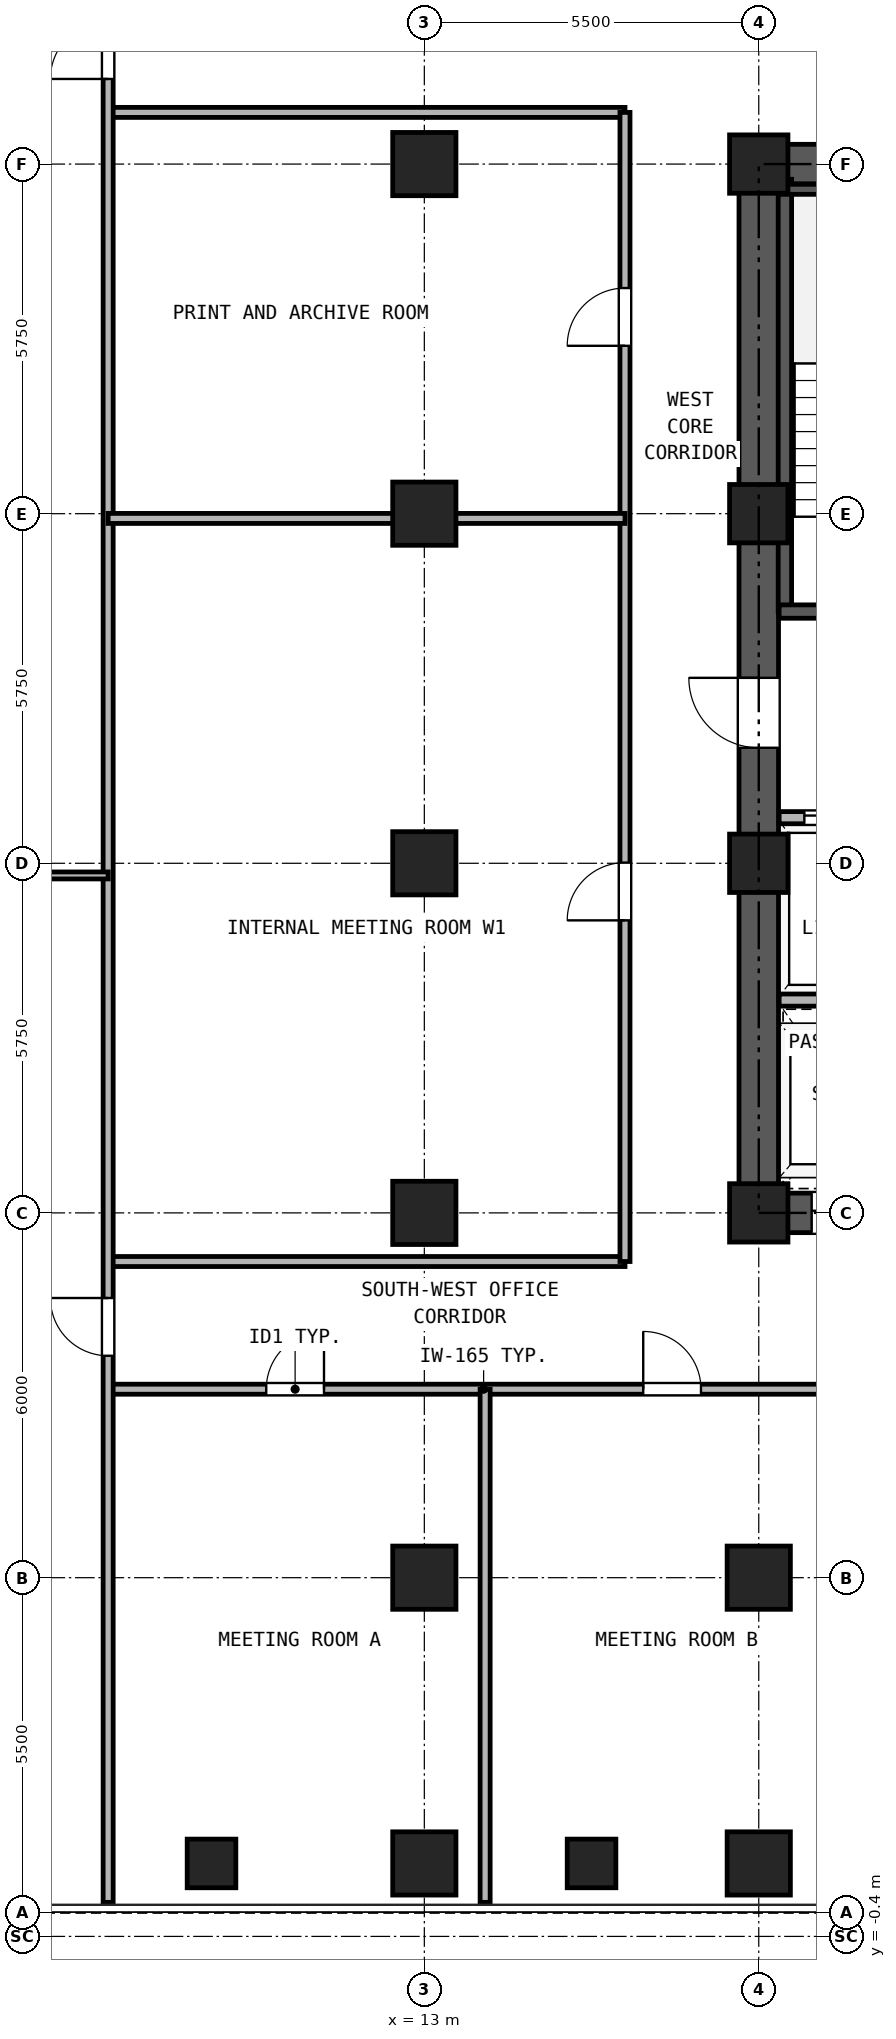
"""IFC4 building model, lengths in metres.
Left out: names, types, materials, properties, quantities, classifications, styles, units other than length and angle.
Written with IfcOpenShell. Run it as: python <this file> out.ifc"""

import sys

from ifc_helpers import new_model, si_unit, direction, frame, frame_2d, origin, origin_2d, place, context, subcontext, project, spatial, rectangle, hollow_rectangle, extrude, source, transform, mapped, element, fill, save


model = new_model("IFC4")
c1 = context("Model", 3, precision=1e-05, world=origin(), true_north=direction((0.0, 1.0)))
c2 = subcontext(c1, "Body", "Model", "MODEL_VIEW")
j1 = project(units=[si_unit("LENGTHUNIT", "METRE"), si_unit("PLANEANGLEUNIT", "RADIAN")], contexts=[c1])
p1 = place(None, origin())
s1 = spatial("IfcSite", under=j1, at=p1, CompositionType="ELEMENT")
p2 = place(p1, origin())
s2 = spatial("IfcBuilding", under=s1, at=p2, CompositionType="ELEMENT")
p3 = place(p2, frame((0.0, 0.0, 69.3)))
s3 = spatial("IfcBuildingStorey", under=s2, at=p3, CompositionType="ELEMENT", Elevation=69.3)
m1 = source(origin(), c2, "Body", "SweptSolid", [
    extrude(hollow_rectangle(XDim=1.04, YDim=1.04, WallThickness=0.065, at=origin_2d()), origin(), (0.0, 0.0, 1.0), 3.32),
])
for number, where, z_axis, x_axis in (
    (1, (13.0, 0.8, 0.0), (0.0, 0.0, 1.0), (1.0, 0.0, 0.0)),
    (2, (18.5, 0.8, 0.0), (0.0, 0.0, 1.0), (1.0, 0.0, 0.0)),
    (3, (13.0, 5.5, 0.0), (0.0, 0.0, 1.0), (1.0, 0.0, 0.0)),
    (4, (13.0, 11.5, 0.0), (0.0, 0.0, 1.0), (1.0, 0.0, 0.0)),
    (5, (13.0, 17.25, 0.0), (0.0, 0.0, 1.0), (1.0, 0.0, 0.0)),
    (6, (13.0, 23.0, 0.0), (0.0, 0.0, 1.0), (1.0, 0.0, 0.0)),
    (7, (13.0, 28.75, 0.0), (0.0, 0.0, 1.0), (1.0, 0.0, 0.0)),
    (8, (18.5, 5.5, 0.0), (0.0, 0.0, 1.0), (1.0, 0.0, 0.0)),
):
    element("IfcColumn", number, at=place(p3, frame(where, z_axis=z_axis, x_axis=x_axis)), inside=s3, PredefinedType="COLUMN", context=c2, shape_type="MappedRepresentation", body=[
        mapped(m1, transform((0.0, 0.0, 0.0), x_axis=(1.0, 0.0, 0.0), y_axis=(0.0, 1.0, 0.0), z_axis=(0.0, 0.0, 1.0), scale=1.0)),
    ])
m2 = source(origin(), c2, "Body", "SweptSolid", [
    extrude(hollow_rectangle(XDim=0.96, YDim=0.96, WallThickness=0.06, at=origin_2d()), origin(), (0.0, 0.0, 1.0), 3.32),
])
for number, where, z_axis, x_axis in (
    (9, (18.5, 11.5, 0.0), (0.0, 0.0, 1.0), (1.0, 0.0, 0.0)),
    (10, (18.5, 17.25, 0.0), (0.0, 0.0, 1.0), (1.0, 0.0, 0.0)),
    (11, (18.5, 23.0, 0.0), (0.0, 0.0, 1.0), (1.0, 0.0, 0.0)),
    (12, (18.5, 28.75, 0.0), (0.0, 0.0, 1.0), (1.0, 0.0, 0.0)),
):
    element("IfcColumn", number, at=place(p3, frame(where, z_axis=z_axis, x_axis=x_axis)), inside=s3, PredefinedType="COLUMN", context=c2, shape_type="MappedRepresentation", body=[
        mapped(m2, transform((0.0, 0.0, 0.0), x_axis=(1.0, 0.0, 0.0), y_axis=(0.0, 1.0, 0.0), z_axis=(0.0, 0.0, 1.0), scale=1.0)),
    ])
m3 = source(origin(), c2, "Body", "SweptSolid", [
    extrude(hollow_rectangle(XDim=0.8, YDim=0.8, WallThickness=0.045, at=origin_2d()), origin(), (0.0, 0.0, 1.0), 3.32),
])
for number, where, z_axis, x_axis in (
    (13, (9.5, 0.8, 0.0), (0.0, 0.0, 1.0), (1.0, 0.0, 0.0)),
    (14, (15.75, 0.8, 0.0), (0.0, 0.0, 1.0), (1.0, 0.0, 0.0)),
):
    element("IfcColumn", number, at=place(p3, frame(where, z_axis=z_axis, x_axis=x_axis)), inside=s3, PredefinedType="COLUMN", context=c2, shape_type="MappedRepresentation", body=[
        mapped(m3, transform((0.0, 0.0, 0.0), x_axis=(1.0, 0.0, 0.0), y_axis=(0.0, 1.0, 0.0), z_axis=(0.0, 0.0, 1.0), scale=1.0)),
    ])
p4 = place(p3, frame((18.175, 11.5, 0.0), z_axis=(0.0, 0.0, 1.0), x_axis=(1.0, 0.0, 0.0)))
e15 = element("IfcWall", 15, at=p4, inside=s3, PredefinedType="SHEAR", context=c2, shape_type="SweptSolid", body=[
    extrude(rectangle(XDim=10.65, YDim=0.65, at=frame_2d((5.325, 0.0))), origin(), (0.0, 0.0, 1.0), 3.32),
])
p5 = place(p4, frame((1.195, 0.0, 0.0)))
e16 = element("IfcOpeningElement", 16, at=p5, cuts=e15, PredefinedType="OPENING", context=c2, shape_type="SweptSolid", body=[
    extrude(rectangle(XDim=1.1, YDim=2.25, at=frame_2d((0.55, 1.125))), frame((0.0, 0.335, 0.0), z_axis=(0.0, -1.0, 0.0), x_axis=(1.0, 0.0, 0.0)), (0.0, 0.0, 1.0), 0.67),
])
p6 = place(p4, frame((3.495, 0.0, 0.0)))
e17 = element("IfcOpeningElement", 17, at=p6, cuts=e15, PredefinedType="OPENING", context=c2, shape_type="SweptSolid", body=[
    extrude(rectangle(XDim=1.1, YDim=2.25, at=frame_2d((0.55, 1.125))), frame((0.0, 0.335, 0.0), z_axis=(0.0, -1.0, 0.0), x_axis=(1.0, 0.0, 0.0)), (0.0, 0.0, 1.0), 0.67),
])
p7 = place(p4, frame((5.925, 0.0, 0.0)))
e18 = element("IfcOpeningElement", 18, at=p7, cuts=e15, PredefinedType="OPENING", context=c2, shape_type="SweptSolid", body=[
    extrude(rectangle(XDim=1.1, YDim=2.25, at=frame_2d((0.55, 1.125))), frame((0.0, 0.335, 0.0), z_axis=(0.0, -1.0, 0.0), x_axis=(1.0, 0.0, 0.0)), (0.0, 0.0, 1.0), 0.67),
])
p8 = place(p4, frame((8.325, 0.0, 0.0)))
e19 = element("IfcOpeningElement", 19, at=p8, cuts=e15, PredefinedType="OPENING", context=c2, shape_type="SweptSolid", body=[
    extrude(rectangle(XDim=1.1, YDim=2.25, at=frame_2d((0.55, 1.125))), frame((0.0, 0.335, 0.0), z_axis=(0.0, -1.0, 0.0), x_axis=(1.0, 0.0, 0.0)), (0.0, 0.0, 1.0), 0.67),
])
p9 = place(p3, frame((18.175, 28.75, 0.0), z_axis=(0.0, 0.0, 1.0), x_axis=(1.0, 0.0, 0.0)))
e20 = element("IfcWall", 20, at=p9, inside=s3, PredefinedType="SHEAR", context=c2, shape_type="SweptSolid", body=[
    extrude(rectangle(XDim=10.65, YDim=0.65, at=frame_2d((5.325, 0.0))), origin(), (0.0, 0.0, 1.0), 3.32),
])
p10 = place(p9, frame((4.205, 0.0, 0.0)))
e21 = element("IfcOpeningElement", 21, at=p10, cuts=e20, PredefinedType="OPENING", context=c2, shape_type="SweptSolid", body=[
    extrude(rectangle(XDim=0.9, YDim=2.05, at=frame_2d((0.45, 1.025))), frame((0.0, 0.335, 0.0), z_axis=(0.0, -1.0, 0.0), x_axis=(1.0, 0.0, 0.0)), (0.0, 0.0, 1.0), 0.67),
])
p11 = place(p9, frame((5.745, 0.0, 0.0)))
e22 = element("IfcOpeningElement", 22, at=p11, cuts=e20, PredefinedType="OPENING", context=c2, shape_type="SweptSolid", body=[
    extrude(rectangle(XDim=0.9, YDim=2.05, at=frame_2d((0.45, 1.025))), frame((0.0, 0.335, 0.0), z_axis=(0.0, -1.0, 0.0), x_axis=(1.0, 0.0, 0.0)), (0.0, 0.0, 1.0), 0.67),
])
p12 = place(p3, frame((18.5, 11.825, 0.0), z_axis=(0.0, 0.0, 1.0), x_axis=(0.0, 1.0, 0.0)))
e23 = element("IfcWall", 23, at=p12, inside=s3, PredefinedType="SHEAR", context=c2, shape_type="SweptSolid", body=[
    extrude(rectangle(XDim=16.6, YDim=0.65, at=frame_2d((8.3, 0.0))), origin(), (0.0, 0.0, 1.0), 3.32),
])
p13 = place(p12, frame((7.325, 0.0, 0.0)))
e24 = element("IfcOpeningElement", 24, at=p13, cuts=e23, PredefinedType="OPENING", context=c2, shape_type="SweptSolid", body=[
    extrude(rectangle(XDim=1.15, YDim=2.2, at=frame_2d((0.575, 1.1))), frame((0.0, 0.335, 0.0), z_axis=(0.0, -1.0, 0.0), x_axis=(1.0, 0.0, 0.0)), (0.0, 0.0, 1.0), 0.67),
])
p14 = place(p3, frame((18.93, 21.39, 0.0), z_axis=(0.0, 0.0, 1.0), x_axis=(0.0, 1.0, 0.0)))
e25 = element("IfcWall", 25, at=p14, inside=s3, PredefinedType="SOLIDWALL", context=c2, shape_type="SweptSolid", body=[
    extrude(rectangle(XDim=7.11, YDim=0.22, at=frame_2d((3.555, 0.0))), origin(), (0.0, 0.0, 1.0), 3.32),
])
p15 = place(p3, frame((18.835, 28.335, 0.0), z_axis=(0.0, 0.0, 1.0), x_axis=(1.0, 0.0, 0.0)))
e26 = element("IfcWall", 26, at=p15, inside=s3, PredefinedType="PARTITIONING", context=c2, shape_type="SweptSolid", body=[
    extrude(rectangle(XDim=3.275, YDim=0.165, at=frame_2d((1.638, 0.0))), origin(), (0.0, 0.0, 1.0), 3.32),
])
p16 = place(p3, frame((18.835, 21.39, 0.0), z_axis=(0.0, 0.0, 1.0), x_axis=(1.0, 0.0, 0.0)))
e27 = element("IfcWall", 27, at=p16, inside=s3, PredefinedType="SOLIDWALL", context=c2, shape_type="SweptSolid", body=[
    extrude(rectangle(XDim=6.295, YDim=0.22, at=frame_2d((3.147, 0.0))), origin(), (0.0, 0.0, 1.0), 3.32),
])
p17 = place(p16, frame((1.015, 0.0, 0.0)))
e28 = element("IfcOpeningElement", 28, at=p17, cuts=e27, PredefinedType="OPENING", context=c2, shape_type="SweptSolid", body=[
    extrude(rectangle(XDim=1.15, YDim=2.2, at=frame_2d((0.575, 1.1))), frame((0.0, 0.12, 0.0), z_axis=(0.0, -1.0, 0.0), x_axis=(1.0, 0.0, 0.0)), (0.0, 0.0, 1.0), 0.24),
])
p18 = place(p16, frame((4.745, 0.0, 0.0)))
e29 = element("IfcOpeningElement", 29, at=p18, cuts=e27, PredefinedType="OPENING", context=c2, shape_type="SweptSolid", body=[
    extrude(rectangle(XDim=1.1, YDim=2.25, at=frame_2d((0.55, 1.125))), frame((0.0, 0.12, 0.0), z_axis=(0.0, -1.0, 0.0), x_axis=(1.0, 0.0, 0.0)), (0.0, 0.0, 1.0), 0.24),
])
p19 = place(p3, frame((18.835, 18.0, 0.0), z_axis=(0.0, 0.0, 1.0), x_axis=(1.0, 0.0, 0.0)))
e30 = element("IfcWall", 30, at=p19, inside=s3, PredefinedType="PARTITIONING", context=c2, shape_type="SweptSolid", body=[
    extrude(rectangle(XDim=9.33, YDim=0.2, at=frame_2d((4.665, 0.0))), origin(), (0.0, 0.0, 1.0), 3.32),
])
p20 = place(p19, frame((0.415, 0.0, 0.0)))
e31 = element("IfcOpeningElement", 31, at=p20, cuts=e30, PredefinedType="OPENING", context=c2, shape_type="SweptSolid", body=[
    extrude(rectangle(XDim=1.3, YDim=2.3, at=frame_2d((0.65, 1.15))), frame((0.0, 0.11, 0.0), z_axis=(0.0, -1.0, 0.0), x_axis=(1.0, 0.0, 0.0)), (0.0, 0.0, 1.0), 0.22),
])
p21 = place(p19, frame((2.515, 0.0, 0.0)))
e32 = element("IfcOpeningElement", 32, at=p21, cuts=e30, PredefinedType="OPENING", context=c2, shape_type="SweptSolid", body=[
    extrude(rectangle(XDim=1.3, YDim=2.3, at=frame_2d((0.65, 1.15))), frame((0.0, 0.11, 0.0), z_axis=(0.0, -1.0, 0.0), x_axis=(1.0, 0.0, 0.0)), (0.0, 0.0, 1.0), 0.22),
])
p22 = place(p19, frame((7.015, 0.0, 0.0)))
e33 = element("IfcOpeningElement", 33, at=p22, cuts=e30, PredefinedType="OPENING", context=c2, shape_type="SweptSolid", body=[
    extrude(rectangle(XDim=1.0, YDim=2.15, at=frame_2d((0.5, 1.075))), frame((0.0, 0.11, 0.0), z_axis=(0.0, -1.0, 0.0), x_axis=(1.0, 0.0, 0.0)), (0.0, 0.0, 1.0), 0.22),
])
p23 = place(p3, frame((18.835, 15.0, 0.0), z_axis=(0.0, 0.0, 1.0), x_axis=(1.0, 0.0, 0.0)))
e34 = element("IfcWall", 34, at=p23, inside=s3, PredefinedType="PARTITIONING", context=c2, shape_type="SweptSolid", body=[
    extrude(rectangle(XDim=9.33, YDim=0.2, at=frame_2d((4.665, 0.0))), origin(), (0.0, 0.0, 1.0), 3.32),
])
p24 = place(p3, frame((7.8, 8.6, 0.0), z_axis=(0.0, 0.0, 1.0), x_axis=(1.0, 0.0, 0.0)))
e35 = element("IfcWall", 35, at=p24, inside=s3, PredefinedType="PARTITIONING", context=c2, shape_type="SweptSolid", body=[
    extrude(rectangle(XDim=31.4, YDim=0.165, at=frame_2d((15.7, 0.0))), origin(), (0.0, 0.0, 1.0), 2.898),
])
p25 = place(p24, frame((2.6, 0.0, 0.0)))
e36 = element("IfcOpeningElement", 36, at=p25, cuts=e35, PredefinedType="OPENING", context=c2, shape_type="SweptSolid", body=[
    extrude(rectangle(XDim=0.95, YDim=2.15, at=frame_2d((0.475, 1.075))), frame((0.0, 0.093, 0.0), z_axis=(0.0, -1.0, 0.0), x_axis=(1.0, 0.0, 0.0)), (0.0, 0.0, 1.0), 0.185),
])
p26 = place(p24, frame((8.8, 0.0, 0.0)))
e37 = element("IfcOpeningElement", 37, at=p26, cuts=e35, PredefinedType="OPENING", context=c2, shape_type="SweptSolid", body=[
    extrude(rectangle(XDim=0.95, YDim=2.15, at=frame_2d((0.475, 1.075))), frame((0.0, 0.093, 0.0), z_axis=(0.0, -1.0, 0.0), x_axis=(1.0, 0.0, 0.0)), (0.0, 0.0, 1.0), 0.185),
])
p27 = place(p24, frame((15.0, 0.0, 0.0)))
e38 = element("IfcOpeningElement", 38, at=p27, cuts=e35, PredefinedType="OPENING", context=c2, shape_type="SweptSolid", body=[
    extrude(rectangle(XDim=0.95, YDim=2.15, at=frame_2d((0.475, 1.075))), frame((0.0, 0.093, 0.0), z_axis=(0.0, -1.0, 0.0), x_axis=(1.0, 0.0, 0.0)), (0.0, 0.0, 1.0), 0.185),
])
p28 = place(p24, frame((21.2, 0.0, 0.0)))
e39 = element("IfcOpeningElement", 39, at=p28, cuts=e35, PredefinedType="OPENING", context=c2, shape_type="SweptSolid", body=[
    extrude(rectangle(XDim=0.95, YDim=2.15, at=frame_2d((0.475, 1.075))), frame((0.0, 0.093, 0.0), z_axis=(0.0, -1.0, 0.0), x_axis=(1.0, 0.0, 0.0)), (0.0, 0.0, 1.0), 0.185),
])
p29 = place(p24, frame((26.2, 0.0, 0.0)))
e40 = element("IfcOpeningElement", 40, at=p29, cuts=e35, PredefinedType="OPENING", context=c2, shape_type="SweptSolid", body=[
    extrude(rectangle(XDim=0.95, YDim=2.15, at=frame_2d((0.475, 1.075))), frame((0.0, 0.093, 0.0), z_axis=(0.0, -1.0, 0.0), x_axis=(1.0, 0.0, 0.0)), (0.0, 0.0, 1.0), 0.185),
])
p30 = place(p24, frame((29.5, 0.0, 0.0)))
e41 = element("IfcOpeningElement", 41, at=p30, cuts=e35, PredefinedType="OPENING", context=c2, shape_type="SweptSolid", body=[
    extrude(rectangle(XDim=0.92, YDim=2.1, at=frame_2d((0.46, 1.05))), frame((0.0, 0.093, 0.0), z_axis=(0.0, -1.0, 0.0), x_axis=(1.0, 0.0, 0.0)), (0.0, 0.0, 1.0), 0.185),
])
for number, where, z_axis, x_axis in (
    (42, (7.8, 10.7, 0.0), (0.0, 0.0, 1.0), (1.0, 0.0, 0.0)),
    (43, (7.8, 29.6, 0.0), (0.0, 0.0, 1.0), (1.0, 0.0, 0.0)),
):
    element("IfcWall", number, at=place(p3, frame(where, z_axis=z_axis, x_axis=x_axis)), inside=s3, PredefinedType="PARTITIONING", context=c2, shape_type="SweptSolid", body=[
        extrude(rectangle(XDim=8.5, YDim=0.165, at=frame_2d((4.25, 0.0))), origin(), (0.0, 0.0, 1.0), 3.32),
    ])
p31 = place(p3, frame((16.3, 10.7, 0.0), z_axis=(0.0, 0.0, 1.0), x_axis=(0.0, 1.0, 0.0)))
e44 = element("IfcWall", 44, at=p31, inside=s3, PredefinedType="PARTITIONING", context=c2, shape_type="SweptSolid", body=[
    extrude(rectangle(XDim=18.9, YDim=0.165, at=frame_2d((9.45, 0.0))), origin(), (0.0, 0.0, 1.0), 3.32),
])
p32 = place(p31, frame((5.611, 0.0, 0.0)))
e45 = element("IfcOpeningElement", 45, at=p32, cuts=e44, PredefinedType="OPENING", context=c2, shape_type="SweptSolid", body=[
    extrude(rectangle(XDim=0.95, YDim=2.15, at=frame_2d((0.475, 1.075))), frame((0.0, 0.093, 0.0), z_axis=(0.0, -1.0, 0.0), x_axis=(1.0, 0.0, 0.0)), (0.0, 0.0, 1.0), 0.185),
])
p33 = place(p31, frame((15.061, 0.0, 0.0)))
e46 = element("IfcOpeningElement", 46, at=p33, cuts=e44, PredefinedType="OPENING", context=c2, shape_type="SweptSolid", body=[
    extrude(rectangle(XDim=0.95, YDim=2.15, at=frame_2d((0.475, 1.075))), frame((0.0, 0.093, 0.0), z_axis=(0.0, -1.0, 0.0), x_axis=(1.0, 0.0, 0.0)), (0.0, 0.0, 1.0), 0.185),
])
p34 = place(p3, frame((7.8, 0.16, 0.0), z_axis=(0.0, 0.0, 1.0), x_axis=(0.0, 1.0, 0.0)))
e47 = element("IfcWall", 47, at=p34, inside=s3, PredefinedType="PARTITIONING", context=c2, shape_type="SweptSolid", body=[
    extrude(rectangle(XDim=40.18, YDim=0.165, at=frame_2d((20.09, 0.0))), origin(), (0.0, 0.0, 1.0), 3.32),
])
p35 = place(p34, frame((8.99, 0.0, 0.0)))
e48 = element("IfcOpeningElement", 48, at=p35, cuts=e47, PredefinedType="OPENING", context=c2, shape_type="SweptSolid", body=[
    extrude(rectangle(XDim=0.95, YDim=2.15, at=frame_2d((0.475, 1.075))), frame((0.0, 0.093, 0.0), z_axis=(0.0, -1.0, 0.0), x_axis=(1.0, 0.0, 0.0)), (0.0, 0.0, 1.0), 0.185),
])
p36 = place(p34, frame((29.99, 0.0, 0.0)))
e49 = element("IfcOpeningElement", 49, at=p36, cuts=e47, PredefinedType="OPENING", context=c2, shape_type="SweptSolid", body=[
    extrude(rectangle(XDim=0.95, YDim=2.15, at=frame_2d((0.475, 1.075))), frame((0.0, 0.093, 0.0), z_axis=(0.0, -1.0, 0.0), x_axis=(1.0, 0.0, 0.0)), (0.0, 0.0, 1.0), 0.185),
])
p37 = place(p3, frame((14.0, 0.16, 0.0), z_axis=(0.0, 0.0, 1.0), x_axis=(0.0, 1.0, 0.0)))
e50 = element("IfcWall", 50, at=p37, inside=s3, PredefinedType="PARTITIONING", context=c2, shape_type="SweptSolid", body=[
    extrude(rectangle(XDim=8.44, YDim=0.165, at=frame_2d((4.22, 0.0))), origin(), (0.0, 0.0, 1.0), 3.32),
])
p38 = place(p3, frame((0.16, 17.05, 0.0), z_axis=(0.0, 0.0, 1.0), x_axis=(1.0, 0.0, 0.0)))
e51 = element("IfcWall", 51, at=p38, inside=s3, PredefinedType="PARTITIONING", context=c2, shape_type="SweptSolid", body=[
    extrude(rectangle(XDim=7.64, YDim=0.115, at=frame_2d((3.82, 0.0))), origin(), (0.0, 0.0, 1.0), 2.539),
])
p39 = place(p3, frame((7.8, 22.922, 0.0), z_axis=(0.0, 0.0, 1.0), x_axis=(1.0, 0.0, 0.0)))
e52 = element("IfcWall", 52, at=p39, inside=s3, PredefinedType="PARTITIONING", context=c2, shape_type="SweptSolid", body=[
    extrude(rectangle(XDim=8.5, YDim=0.165, at=frame_2d((4.25, 0.0))), origin(), (0.0, 0.0, 1.0), 2.539),
])
p40 = place(p20, origin())
e53 = element("IfcDoor", 53, at=p40, inside=s3, OperationType="DOUBLE_DOOR_SLIDING", PredefinedType="DOOR", context=c2, shape_type="SweptSolid", body=[
    extrude(rectangle(XDim=1.3, YDim=2.3, at=frame_2d((0.65, 1.15))), frame((0.0, 0.025, 0.0), z_axis=(0.0, -1.0, 0.0), x_axis=(1.0, 0.0, 0.0)), (0.0, 0.0, 1.0), 0.05),
])
fill(e31, e53)
p41 = place(p13, frame((1.15, 0.0, 0.0), z_axis=(0.0, 0.0, 1.0), x_axis=(-1.0, 0.0, 0.0)))
e54 = element("IfcDoor", 54, at=p41, inside=s3, OperationType="SINGLE_SWING_RIGHT", PredefinedType="DOOR", context=c2, shape_type="SweptSolid", body=[
    extrude(rectangle(XDim=1.15, YDim=2.2, at=frame_2d((0.575, 1.1))), frame((0.0, 0.025, 0.0), z_axis=(0.0, -1.0, 0.0), x_axis=(1.0, 0.0, 0.0)), (0.0, 0.0, 1.0), 0.05),
])
fill(e24, e54)
p42 = place(p5, frame((1.1, 0.0, 0.0), z_axis=(0.0, 0.0, 1.0), x_axis=(-1.0, 0.0, 0.0)))
e55 = element("IfcDoor", 55, at=p42, inside=s3, OperationType="DOUBLE_DOOR_SLIDING", PredefinedType="DOOR", context=c2, shape_type="SweptSolid", body=[
    extrude(rectangle(XDim=1.1, YDim=2.25, at=frame_2d((0.55, 1.125))), frame((0.0, 0.025, 0.0), z_axis=(0.0, -1.0, 0.0), x_axis=(1.0, 0.0, 0.0)), (0.0, 0.0, 1.0), 0.05),
])
fill(e16, e55)
p43 = place(p25, frame((0.95, 0.0, 0.0), z_axis=(0.0, 0.0, 1.0), x_axis=(-1.0, 0.0, 0.0)))
e56 = element("IfcDoor", 56, at=p43, inside=s3, OperationType="SINGLE_SWING_RIGHT", PredefinedType="DOOR", context=c2, shape_type="SweptSolid", body=[
    extrude(rectangle(XDim=0.95, YDim=2.15, at=frame_2d((0.475, 1.075))), frame((0.0, 0.025, 0.0), z_axis=(0.0, -1.0, 0.0), x_axis=(1.0, 0.0, 0.0)), (0.0, 0.0, 1.0), 0.05),
])
fill(e36, e56)
p44 = place(p26, frame((0.95, 0.0, 0.0), z_axis=(0.0, 0.0, 1.0), x_axis=(-1.0, 0.0, 0.0)))
e57 = element("IfcDoor", 57, at=p44, inside=s3, OperationType="SINGLE_SWING_LEFT", PredefinedType="DOOR", context=c2, shape_type="SweptSolid", body=[
    extrude(rectangle(XDim=0.95, YDim=2.15, at=frame_2d((0.475, 1.075))), frame((0.0, 0.025, 0.0), z_axis=(0.0, -1.0, 0.0), x_axis=(1.0, 0.0, 0.0)), (0.0, 0.0, 1.0), 0.05),
])
fill(e37, e57)
p45 = place(p35, frame((0.95, 0.0, 0.0), z_axis=(0.0, 0.0, 1.0), x_axis=(-1.0, 0.0, 0.0)))
e58 = element("IfcDoor", 58, at=p45, inside=s3, OperationType="SINGLE_SWING_RIGHT", PredefinedType="DOOR", context=c2, shape_type="SweptSolid", body=[
    extrude(rectangle(XDim=0.95, YDim=2.15, at=frame_2d((0.475, 1.075))), frame((0.0, 0.025, 0.0), z_axis=(0.0, -1.0, 0.0), x_axis=(1.0, 0.0, 0.0)), (0.0, 0.0, 1.0), 0.05),
])
fill(e48, e58)
p46 = place(p36, frame((0.95, 0.0, 0.0), z_axis=(0.0, 0.0, 1.0), x_axis=(-1.0, 0.0, 0.0)))
e59 = element("IfcDoor", 59, at=p46, inside=s3, OperationType="SINGLE_SWING_LEFT", PredefinedType="DOOR", context=c2, shape_type="SweptSolid", body=[
    extrude(rectangle(XDim=0.95, YDim=2.15, at=frame_2d((0.475, 1.075))), frame((0.0, 0.025, 0.0), z_axis=(0.0, -1.0, 0.0), x_axis=(1.0, 0.0, 0.0)), (0.0, 0.0, 1.0), 0.05),
])
fill(e49, e59)
p47 = place(p32, frame((0.95, 0.0, 0.0), z_axis=(0.0, 0.0, 1.0), x_axis=(-1.0, 0.0, 0.0)))
e60 = element("IfcDoor", 60, at=p47, inside=s3, OperationType="SINGLE_SWING_LEFT", PredefinedType="DOOR", context=c2, shape_type="SweptSolid", body=[
    extrude(rectangle(XDim=0.95, YDim=2.15, at=frame_2d((0.475, 1.075))), frame((0.0, 0.025, 0.0), z_axis=(0.0, -1.0, 0.0), x_axis=(1.0, 0.0, 0.0)), (0.0, 0.0, 1.0), 0.05),
])
fill(e45, e60)
p48 = place(p33, frame((0.95, 0.0, 0.0), z_axis=(0.0, 0.0, 1.0), x_axis=(-1.0, 0.0, 0.0)))
e61 = element("IfcDoor", 61, at=p48, inside=s3, OperationType="SINGLE_SWING_LEFT", PredefinedType="DOOR", context=c2, shape_type="SweptSolid", body=[
    extrude(rectangle(XDim=0.95, YDim=2.15, at=frame_2d((0.475, 1.075))), frame((0.0, 0.025, 0.0), z_axis=(0.0, -1.0, 0.0), x_axis=(1.0, 0.0, 0.0)), (0.0, 0.0, 1.0), 0.05),
])
fill(e46, e61)
save(model, sys.argv[1])
